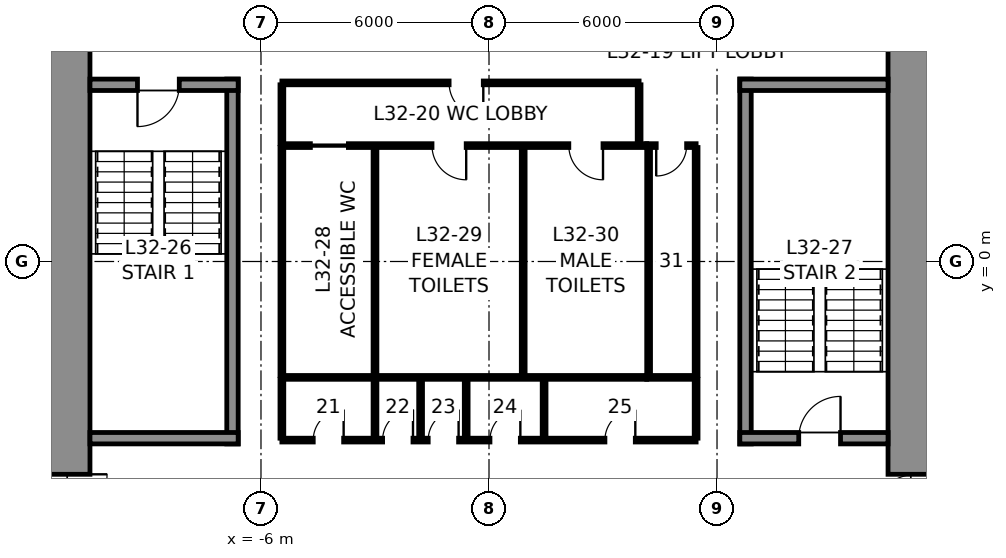
"""IFC4 building model, lengths in metres.
Left out: names, types, materials, properties, quantities, classifications, styles, units other than length and angle.
Written with IfcOpenShell. Run it as: python <this file> out.ifc"""

import sys

from ifc_helpers import new_model, si_unit, direction, frame, frame_2d, origin, place, context, subcontext, project, spatial, rectangle, extrude, element, fill, save


model = new_model("IFC4")
c1 = context("Model", 3, precision=1e-05, world=origin(), true_north=direction((0.0, 1.0)))
c2 = subcontext(c1, "Body", "Model", "MODEL_VIEW")
j1 = project(units=[si_unit("LENGTHUNIT", "METRE"), si_unit("PLANEANGLEUNIT", "RADIAN")], contexts=[c1])
p1 = place(None, origin())
s1 = spatial("IfcSite", under=j1, at=p1, CompositionType="ELEMENT")
p2 = place(p1, origin())
s2 = spatial("IfcBuilding", under=s1, at=p2, CompositionType="ELEMENT")
p3 = place(p2, frame((0.0, 0.0, 155.8)))
s3 = spatial("IfcBuildingStorey", under=s2, at=p3, CompositionType="ELEMENT", Elevation=155.8)
p4 = place(p3, frame((11.25, 10.5, 0.0), z_axis=(0.0, 0.0, 1.0), x_axis=(0.0, -1.0, 0.0)))
e1 = element("IfcWall", 1, at=p4, inside=s3, PredefinedType="SHEAR", context=c2, shape_type="SweptSolid", body=[
    extrude(rectangle(XDim=21.0, YDim=1.5, at=frame_2d((10.5, 0.0))), origin(), (0.0, 0.0, 1.0), 4.0),
])
p5 = place(p4, frame((3.7, 0.0, 0.0)))
e2 = element("IfcOpeningElement", 2, at=p5, cuts=e1, PredefinedType="OPENING", context=c2, shape_type="SweptSolid", body=[
    extrude(rectangle(XDim=1.2, YDim=2.3, at=frame_2d((0.6, 1.15))), frame((0.0, 0.76, 0.0), z_axis=(0.0, -1.0, 0.0), x_axis=(1.0, 0.0, 0.0)), (0.0, 0.0, 1.0), 1.52),
])
p6 = place(p4, frame((16.1, 0.0, 0.0)))
e3 = element("IfcOpeningElement", 3, at=p6, cuts=e1, PredefinedType="OPENING", context=c2, shape_type="SweptSolid", body=[
    extrude(rectangle(XDim=1.2, YDim=2.3, at=frame_2d((0.6, 1.15))), frame((0.0, 0.76, 0.0), z_axis=(0.0, -1.0, 0.0), x_axis=(1.0, 0.0, 0.0)), (0.0, 0.0, 1.0), 1.52),
])
p7 = place(p3, frame((-11.25, -10.5, 0.0), z_axis=(0.0, 0.0, 1.0), x_axis=(0.0, 1.0, 0.0)))
e4 = element("IfcWall", 4, at=p7, inside=s3, PredefinedType="SHEAR", context=c2, shape_type="SweptSolid", body=[
    extrude(rectangle(XDim=21.0, YDim=1.5, at=frame_2d((10.5, 0.0))), origin(), (0.0, 0.0, 1.0), 4.0),
])
p8 = place(p7, frame((16.1, 0.0, 0.0)))
e5 = element("IfcOpeningElement", 5, at=p8, cuts=e4, PredefinedType="OPENING", context=c2, shape_type="SweptSolid", body=[
    extrude(rectangle(XDim=1.2, YDim=2.3, at=frame_2d((0.6, 1.15))), frame((0.0, 0.76, 0.0), z_axis=(0.0, -1.0, 0.0), x_axis=(1.0, 0.0, 0.0)), (0.0, 0.0, 1.0), 1.52),
])
p9 = place(p7, frame((3.7, 0.0, 0.0)))
e6 = element("IfcOpeningElement", 6, at=p9, cuts=e4, PredefinedType="OPENING", context=c2, shape_type="SweptSolid", body=[
    extrude(rectangle(XDim=1.2, YDim=2.3, at=frame_2d((0.6, 1.15))), frame((0.0, 0.76, 0.0), z_axis=(0.0, -1.0, 0.0), x_axis=(1.0, 0.0, 0.0)), (0.0, 0.0, 1.0), 1.52),
])
p10 = place(p3, frame((-6.75, -4.8, 0.0), z_axis=(0.0, 0.0, 1.0), x_axis=(0.0, 1.0, 0.0)))
e7 = element("IfcWall", 7, at=p10, inside=s3, PredefinedType="SOLIDWALL", context=c2, shape_type="SweptSolid", body=[
    extrude(rectangle(XDim=9.6, YDim=0.3, at=frame_2d((4.8, 0.0))), origin(), (0.0, 0.0, 1.0), 3.75),
])
p11 = place(p3, frame((-10.5, 4.65, 0.0), z_axis=(0.0, 0.0, 1.0), x_axis=(1.0, 0.0, 0.0)))
e8 = element("IfcWall", 8, at=p11, inside=s3, PredefinedType="SOLIDWALL", context=c2, shape_type="SweptSolid", body=[
    extrude(rectangle(XDim=3.9, YDim=0.3, at=frame_2d((1.95, 0.0))), origin(), (0.0, 0.0, 1.0), 3.75),
])
p12 = place(p11, frame((1.25, 0.0, 0.0)))
e9 = element("IfcOpeningElement", 9, at=p12, cuts=e8, PredefinedType="OPENING", context=c2, shape_type="SweptSolid", body=[
    extrude(rectangle(XDim=1.1, YDim=2.3, at=frame_2d((0.55, 1.15))), frame((0.0, 0.16, 0.0), z_axis=(0.0, -1.0, 0.0), x_axis=(1.0, 0.0, 0.0)), (0.0, 0.0, 1.0), 0.32),
])
p13 = place(p3, frame((-6.6, -4.65, 0.0), z_axis=(0.0, 0.0, 1.0), x_axis=(-1.0, 0.0, 0.0)))
e10 = element("IfcWall", 10, at=p13, inside=s3, PredefinedType="SOLIDWALL", context=c2, shape_type="SweptSolid", body=[
    extrude(rectangle(XDim=3.9, YDim=0.3, at=frame_2d((1.95, 0.0))), origin(), (0.0, 0.0, 1.0), 3.75),
])
p14 = place(p3, frame((6.75, -4.8, 0.0), z_axis=(0.0, 0.0, 1.0), x_axis=(0.0, 1.0, 0.0)))
e11 = element("IfcWall", 11, at=p14, inside=s3, PredefinedType="SOLIDWALL", context=c2, shape_type="SweptSolid", body=[
    extrude(rectangle(XDim=9.6, YDim=0.3, at=frame_2d((4.8, 0.0))), origin(), (0.0, 0.0, 1.0), 3.75),
])
p15 = place(p3, frame((6.6, 4.65, 0.0), z_axis=(0.0, 0.0, 1.0), x_axis=(1.0, 0.0, 0.0)))
e12 = element("IfcWall", 12, at=p15, inside=s3, PredefinedType="SOLIDWALL", context=c2, shape_type="SweptSolid", body=[
    extrude(rectangle(XDim=3.9, YDim=0.3, at=frame_2d((1.95, 0.0))), origin(), (0.0, 0.0, 1.0), 3.75),
])
p16 = place(p3, frame((10.5, -4.65, 0.0), z_axis=(0.0, 0.0, 1.0), x_axis=(-1.0, 0.0, 0.0)))
e13 = element("IfcWall", 13, at=p16, inside=s3, PredefinedType="SOLIDWALL", context=c2, shape_type="SweptSolid", body=[
    extrude(rectangle(XDim=3.9, YDim=0.3, at=frame_2d((1.95, 0.0))), origin(), (0.0, 0.0, 1.0), 3.75),
])
p17 = place(p16, frame((1.25, 0.0, 0.0)))
e14 = element("IfcOpeningElement", 14, at=p17, cuts=e13, PredefinedType="OPENING", context=c2, shape_type="SweptSolid", body=[
    extrude(rectangle(XDim=1.1, YDim=2.3, at=frame_2d((0.55, 1.15))), frame((0.0, 0.16, 0.0), z_axis=(0.0, -1.0, 0.0), x_axis=(1.0, 0.0, 0.0)), (0.0, 0.0, 1.0), 0.32),
])
p18 = place(p3, frame((-5.45, 3.05, 0.0), z_axis=(0.0, 0.0, 1.0), x_axis=(1.0, 0.0, 0.0)))
e15 = element("IfcWall", 15, at=p18, inside=s3, PredefinedType="PARTITIONING", context=c2, shape_type="SweptSolid", body=[
    extrude(rectangle(XDim=9.6, YDim=0.1, at=frame_2d((4.8, 0.0))), origin(), (0.0, 0.0, 1.0), 3.75),
])
p19 = place(p18, frame((0.75, 0.0, 0.0)))
e16 = element("IfcOpeningElement", 16, at=p19, cuts=e15, PredefinedType="OPENING", context=c2, shape_type="SweptSolid", body=[
    extrude(rectangle(XDim=1.0, YDim=2.3, at=frame_2d((0.5, 1.15))), frame((0.0, 0.06, 0.0), z_axis=(0.0, -1.0, 0.0), x_axis=(1.0, 0.0, 0.0)), (0.0, 0.0, 1.0), 0.12),
])
p20 = place(p18, frame((3.95, 0.0, 0.0)))
e17 = element("IfcOpeningElement", 17, at=p20, cuts=e15, PredefinedType="OPENING", context=c2, shape_type="SweptSolid", body=[
    extrude(rectangle(XDim=0.9, YDim=2.3, at=frame_2d((0.45, 1.15))), frame((0.0, 0.06, 0.0), z_axis=(0.0, -1.0, 0.0), x_axis=(1.0, 0.0, 0.0)), (0.0, 0.0, 1.0), 0.12),
])
p21 = place(p18, frame((7.55, 0.0, 0.0)))
e18 = element("IfcOpeningElement", 18, at=p21, cuts=e15, PredefinedType="OPENING", context=c2, shape_type="SweptSolid", body=[
    extrude(rectangle(XDim=0.9, YDim=2.3, at=frame_2d((0.45, 1.15))), frame((0.0, 0.06, 0.0), z_axis=(0.0, -1.0, 0.0), x_axis=(1.0, 0.0, 0.0)), (0.0, 0.0, 1.0), 0.12),
])
p22 = place(p3, frame((4.15, 3.05, 0.0), z_axis=(0.0, 0.0, 1.0), x_axis=(1.0, 0.0, 0.0)))
e19 = element("IfcWall", 19, at=p22, inside=s3, PredefinedType="PARTITIONING", context=c2, shape_type="SweptSolid", body=[
    extrude(rectangle(XDim=1.3, YDim=0.1, at=frame_2d((0.65, 0.0))), origin(), (0.0, 0.0, 1.0), 3.75),
])
p23 = place(p22, frame((0.25, 0.0, 0.0)))
e20 = element("IfcOpeningElement", 20, at=p23, cuts=e19, PredefinedType="OPENING", context=c2, shape_type="SweptSolid", body=[
    extrude(rectangle(XDim=0.8, YDim=2.3, at=frame_2d((0.4, 1.15))), frame((0.0, 0.06, 0.0), z_axis=(0.0, -1.0, 0.0), x_axis=(1.0, 0.0, 0.0)), (0.0, 0.0, 1.0), 0.12),
])
p24 = place(p3, frame((4.15, -3.05, 0.0), z_axis=(0.0, 0.0, 1.0), x_axis=(-1.0, 0.0, 0.0)))
e21 = element("IfcWall", 21, at=p24, inside=s3, PredefinedType="PARTITIONING", context=c2, shape_type="SweptSolid", body=[
    extrude(rectangle(XDim=9.6, YDim=0.1, at=frame_2d((4.8, 0.0))), origin(), (0.0, 0.0, 1.0), 3.75),
])
p25 = place(p3, frame((5.45, -3.05, 0.0), z_axis=(0.0, 0.0, 1.0), x_axis=(-1.0, 0.0, 0.0)))
e22 = element("IfcWall", 22, at=p25, inside=s3, PredefinedType="PARTITIONING", context=c2, shape_type="SweptSolid", body=[
    extrude(rectangle(XDim=1.3, YDim=0.1, at=frame_2d((0.65, 0.0))), origin(), (0.0, 0.0, 1.0), 3.75),
])
for number, where, z_axis, x_axis in (
    (23, (5.45, 3.0, 0.0), (0.0, 0.0, 1.0), (0.0, -1.0, 0.0)),
    (24, (-5.45, -3.0, 0.0), (0.0, 0.0, 1.0), (0.0, 1.0, 0.0)),
    (25, (-3.0, -3.0, 0.0), (0.0, 0.0, 1.0), (0.0, 1.0, 0.0)),
    (26, (0.9, -3.0, 0.0), (0.0, 0.0, 1.0), (0.0, 1.0, 0.0)),
    (27, (4.2, -3.0, 0.0), (0.0, 0.0, 1.0), (0.0, 1.0, 0.0)),
):
    element("IfcWall", number, at=place(p3, frame(where, z_axis=z_axis, x_axis=x_axis)), inside=s3, PredefinedType="PARTITIONING", context=c2, shape_type="SweptSolid", body=[
        extrude(rectangle(XDim=6.0, YDim=0.1, at=frame_2d((3.0, 0.0))), origin(), (0.0, 0.0, 1.0), 3.75),
    ])
p26 = place(p3, frame((-5.45, 4.7, 0.0), z_axis=(0.0, 0.0, 1.0), x_axis=(1.0, 0.0, 0.0)))
e28 = element("IfcWall", 28, at=p26, inside=s3, PredefinedType="PARTITIONING", context=c2, shape_type="SweptSolid", body=[
    extrude(rectangle(XDim=9.4, YDim=0.1, at=frame_2d((4.7, 0.0))), origin(), (0.0, 0.0, 1.0), 3.75),
])
p27 = place(p26, frame((4.4, 0.0, 0.0)))
e29 = element("IfcOpeningElement", 29, at=p27, cuts=e28, PredefinedType="OPENING", context=c2, shape_type="SweptSolid", body=[
    extrude(rectangle(XDim=0.9, YDim=2.3, at=frame_2d((0.45, 1.15))), frame((0.0, 0.06, 0.0), z_axis=(0.0, -1.0, 0.0), x_axis=(1.0, 0.0, 0.0)), (0.0, 0.0, 1.0), 0.12),
])
for number, where, z_axis, x_axis in (
    (30, (-5.45, 3.1, 0.0), (0.0, 0.0, 1.0), (0.0, 1.0, 0.0)),
    (31, (3.95, 3.1, 0.0), (0.0, 0.0, 1.0), (0.0, 1.0, 0.0)),
):
    element("IfcWall", number, at=place(p3, frame(where, z_axis=z_axis, x_axis=x_axis)), inside=s3, PredefinedType="PARTITIONING", context=c2, shape_type="SweptSolid", body=[
        extrude(rectangle(XDim=1.55, YDim=0.1, at=frame_2d((0.775, 0.0))), origin(), (0.0, 0.0, 1.0), 3.75),
    ])
p28 = place(p3, frame((5.45, -4.7, 0.0), z_axis=(0.0, 0.0, 1.0), x_axis=(-1.0, 0.0, 0.0)))
e32 = element("IfcWall", 32, at=p28, inside=s3, PredefinedType="PARTITIONING", context=c2, shape_type="SweptSolid", body=[
    extrude(rectangle(XDim=10.9, YDim=0.1, at=frame_2d((5.45, 0.0))), origin(), (0.0, 0.0, 1.0), 3.75),
])
p29 = place(p28, frame((9.275, 0.0, 0.0)))
e33 = element("IfcOpeningElement", 33, at=p29, cuts=e32, PredefinedType="OPENING", context=c2, shape_type="SweptSolid", body=[
    extrude(rectangle(XDim=0.8, YDim=2.3, at=frame_2d((0.4, 1.15))), frame((0.0, 0.06, 0.0), z_axis=(0.0, -1.0, 0.0), x_axis=(1.0, 0.0, 0.0)), (0.0, 0.0, 1.0), 0.12),
])
p30 = place(p28, frame((7.45, 0.0, 0.0)))
e34 = element("IfcOpeningElement", 34, at=p30, cuts=e32, PredefinedType="OPENING", context=c2, shape_type="SweptSolid", body=[
    extrude(rectangle(XDim=0.8, YDim=2.3, at=frame_2d((0.4, 1.15))), frame((0.0, 0.06, 0.0), z_axis=(0.0, -1.0, 0.0), x_axis=(1.0, 0.0, 0.0)), (0.0, 0.0, 1.0), 0.12),
])
p31 = place(p28, frame((6.25, 0.0, 0.0)))
e35 = element("IfcOpeningElement", 35, at=p31, cuts=e32, PredefinedType="OPENING", context=c2, shape_type="SweptSolid", body=[
    extrude(rectangle(XDim=0.8, YDim=2.3, at=frame_2d((0.4, 1.15))), frame((0.0, 0.06, 0.0), z_axis=(0.0, -1.0, 0.0), x_axis=(1.0, 0.0, 0.0)), (0.0, 0.0, 1.0), 0.12),
])
p32 = place(p28, frame((4.625, 0.0, 0.0)))
e36 = element("IfcOpeningElement", 36, at=p32, cuts=e32, PredefinedType="OPENING", context=c2, shape_type="SweptSolid", body=[
    extrude(rectangle(XDim=0.8, YDim=2.3, at=frame_2d((0.4, 1.15))), frame((0.0, 0.06, 0.0), z_axis=(0.0, -1.0, 0.0), x_axis=(1.0, 0.0, 0.0)), (0.0, 0.0, 1.0), 0.12),
])
p33 = place(p28, frame((1.6, 0.0, 0.0)))
e37 = element("IfcOpeningElement", 37, at=p33, cuts=e32, PredefinedType="OPENING", context=c2, shape_type="SweptSolid", body=[
    extrude(rectangle(XDim=0.8, YDim=2.3, at=frame_2d((0.4, 1.15))), frame((0.0, 0.06, 0.0), z_axis=(0.0, -1.0, 0.0), x_axis=(1.0, 0.0, 0.0)), (0.0, 0.0, 1.0), 0.12),
])
for number, where, z_axis, x_axis in (
    (38, (-5.45, -3.1, 0.0), (0.0, 0.0, 1.0), (0.0, -1.0, 0.0)),
    (39, (5.45, -3.1, 0.0), (0.0, 0.0, 1.0), (0.0, -1.0, 0.0)),
    (40, (-3.0, -3.1, 0.0), (0.0, 0.0, 1.0), (0.0, -1.0, 0.0)),
    (41, (-1.8, -3.1, 0.0), (0.0, 0.0, 1.0), (0.0, -1.0, 0.0)),
    (42, (-0.6, -3.1, 0.0), (0.0, 0.0, 1.0), (0.0, -1.0, 0.0)),
    (43, (1.45, -3.1, 0.0), (0.0, 0.0, 1.0), (0.0, -1.0, 0.0)),
):
    element("IfcWall", number, at=place(p3, frame(where, z_axis=z_axis, x_axis=x_axis)), inside=s3, PredefinedType="PARTITIONING", context=c2, shape_type="SweptSolid", body=[
        extrude(rectangle(XDim=1.55, YDim=0.1, at=frame_2d((0.775, 0.0))), origin(), (0.0, 0.0, 1.0), 3.75),
    ])
p34 = place(p12, frame((1.1, 0.0, 0.0), z_axis=(0.0, 0.0, 1.0), x_axis=(-1.0, 0.0, 0.0)))
e44 = element("IfcDoor", 44, at=p34, inside=s3, OperationType="SINGLE_SWING_RIGHT", PredefinedType="DOOR", context=c2, shape_type="SweptSolid", body=[
    extrude(rectangle(XDim=1.1, YDim=2.3, at=frame_2d((0.55, 1.15))), frame((0.0, 0.025, 0.0), z_axis=(0.0, -1.0, 0.0), x_axis=(1.0, 0.0, 0.0)), (0.0, 0.0, 1.0), 0.05),
])
fill(e9, e44)
p35 = place(p17, frame((1.1, 0.0, 0.0), z_axis=(0.0, 0.0, 1.0), x_axis=(-1.0, 0.0, 0.0)))
e45 = element("IfcDoor", 45, at=p35, inside=s3, OperationType="SINGLE_SWING_RIGHT", PredefinedType="DOOR", context=c2, shape_type="SweptSolid", body=[
    extrude(rectangle(XDim=1.1, YDim=2.3, at=frame_2d((0.55, 1.15))), frame((0.0, 0.025, 0.0), z_axis=(0.0, -1.0, 0.0), x_axis=(1.0, 0.0, 0.0)), (0.0, 0.0, 1.0), 0.05),
])
fill(e14, e45)
p36 = place(p19, frame((1.0, 0.0, 0.0), z_axis=(0.0, 0.0, 1.0), x_axis=(-1.0, 0.0, 0.0)))
e46 = element("IfcDoor", 46, at=p36, inside=s3, OperationType="SLIDING_TO_LEFT", PredefinedType="DOOR", context=c2, shape_type="SweptSolid", body=[
    extrude(rectangle(XDim=1.0, YDim=2.3, at=frame_2d((0.5, 1.15))), frame((0.0, 0.025, 0.0), z_axis=(0.0, -1.0, 0.0), x_axis=(1.0, 0.0, 0.0)), (0.0, 0.0, 1.0), 0.05),
])
fill(e16, e46)
p37 = place(p20, frame((0.9, 0.0, 0.0), z_axis=(0.0, 0.0, 1.0), x_axis=(-1.0, 0.0, 0.0)))
e47 = element("IfcDoor", 47, at=p37, inside=s3, OperationType="SINGLE_SWING_LEFT", PredefinedType="DOOR", context=c2, shape_type="SweptSolid", body=[
    extrude(rectangle(XDim=0.9, YDim=2.3, at=frame_2d((0.45, 1.15))), frame((0.0, 0.025, 0.0), z_axis=(0.0, -1.0, 0.0), x_axis=(1.0, 0.0, 0.0)), (0.0, 0.0, 1.0), 0.05),
])
fill(e17, e47)
p38 = place(p21, frame((0.9, 0.0, 0.0), z_axis=(0.0, 0.0, 1.0), x_axis=(-1.0, 0.0, 0.0)))
e48 = element("IfcDoor", 48, at=p38, inside=s3, OperationType="SINGLE_SWING_LEFT", PredefinedType="DOOR", context=c2, shape_type="SweptSolid", body=[
    extrude(rectangle(XDim=0.9, YDim=2.3, at=frame_2d((0.45, 1.15))), frame((0.0, 0.025, 0.0), z_axis=(0.0, -1.0, 0.0), x_axis=(1.0, 0.0, 0.0)), (0.0, 0.0, 1.0), 0.05),
])
fill(e18, e48)
p39 = place(p23, frame((0.8, 0.0, 0.0), z_axis=(0.0, 0.0, 1.0), x_axis=(-1.0, 0.0, 0.0)))
e49 = element("IfcDoor", 49, at=p39, inside=s3, OperationType="SINGLE_SWING_RIGHT", PredefinedType="DOOR", context=c2, shape_type="SweptSolid", body=[
    extrude(rectangle(XDim=0.8, YDim=2.3, at=frame_2d((0.4, 1.15))), frame((0.0, 0.025, 0.0), z_axis=(0.0, -1.0, 0.0), x_axis=(1.0, 0.0, 0.0)), (0.0, 0.0, 1.0), 0.05),
])
fill(e20, e49)
p40 = place(p27, frame((0.9, 0.0, 0.0), z_axis=(0.0, 0.0, 1.0), x_axis=(-1.0, 0.0, 0.0)))
e50 = element("IfcDoor", 50, at=p40, inside=s3, OperationType="SINGLE_SWING_LEFT", PredefinedType="DOOR", context=c2, shape_type="SweptSolid", body=[
    extrude(rectangle(XDim=0.9, YDim=2.3, at=frame_2d((0.45, 1.15))), frame((0.0, 0.025, 0.0), z_axis=(0.0, -1.0, 0.0), x_axis=(1.0, 0.0, 0.0)), (0.0, 0.0, 1.0), 0.05),
])
fill(e29, e50)
p41 = place(p29, frame((0.8, 0.0, 0.0), z_axis=(0.0, 0.0, 1.0), x_axis=(-1.0, 0.0, 0.0)))
e51 = element("IfcDoor", 51, at=p41, inside=s3, OperationType="SINGLE_SWING_RIGHT", PredefinedType="DOOR", context=c2, shape_type="SweptSolid", body=[
    extrude(rectangle(XDim=0.8, YDim=2.3, at=frame_2d((0.4, 1.15))), frame((0.0, 0.025, 0.0), z_axis=(0.0, -1.0, 0.0), x_axis=(1.0, 0.0, 0.0)), (0.0, 0.0, 1.0), 0.05),
])
fill(e33, e51)
p42 = place(p30, frame((0.8, 0.0, 0.0), z_axis=(0.0, 0.0, 1.0), x_axis=(-1.0, 0.0, 0.0)))
e52 = element("IfcDoor", 52, at=p42, inside=s3, OperationType="SINGLE_SWING_RIGHT", PredefinedType="DOOR", context=c2, shape_type="SweptSolid", body=[
    extrude(rectangle(XDim=0.8, YDim=2.3, at=frame_2d((0.4, 1.15))), frame((0.0, 0.025, 0.0), z_axis=(0.0, -1.0, 0.0), x_axis=(1.0, 0.0, 0.0)), (0.0, 0.0, 1.0), 0.05),
])
fill(e34, e52)
p43 = place(p31, frame((0.8, 0.0, 0.0), z_axis=(0.0, 0.0, 1.0), x_axis=(-1.0, 0.0, 0.0)))
e53 = element("IfcDoor", 53, at=p43, inside=s3, OperationType="SINGLE_SWING_RIGHT", PredefinedType="DOOR", context=c2, shape_type="SweptSolid", body=[
    extrude(rectangle(XDim=0.8, YDim=2.3, at=frame_2d((0.4, 1.15))), frame((0.0, 0.025, 0.0), z_axis=(0.0, -1.0, 0.0), x_axis=(1.0, 0.0, 0.0)), (0.0, 0.0, 1.0), 0.05),
])
fill(e35, e53)
p44 = place(p32, frame((0.8, 0.0, 0.0), z_axis=(0.0, 0.0, 1.0), x_axis=(-1.0, 0.0, 0.0)))
e54 = element("IfcDoor", 54, at=p44, inside=s3, OperationType="SINGLE_SWING_RIGHT", PredefinedType="DOOR", context=c2, shape_type="SweptSolid", body=[
    extrude(rectangle(XDim=0.8, YDim=2.3, at=frame_2d((0.4, 1.15))), frame((0.0, 0.025, 0.0), z_axis=(0.0, -1.0, 0.0), x_axis=(1.0, 0.0, 0.0)), (0.0, 0.0, 1.0), 0.05),
])
fill(e36, e54)
p45 = place(p33, frame((0.8, 0.0, 0.0), z_axis=(0.0, 0.0, 1.0), x_axis=(-1.0, 0.0, 0.0)))
e55 = element("IfcDoor", 55, at=p45, inside=s3, OperationType="SINGLE_SWING_RIGHT", PredefinedType="DOOR", context=c2, shape_type="SweptSolid", body=[
    extrude(rectangle(XDim=0.8, YDim=2.3, at=frame_2d((0.4, 1.15))), frame((0.0, 0.025, 0.0), z_axis=(0.0, -1.0, 0.0), x_axis=(1.0, 0.0, 0.0)), (0.0, 0.0, 1.0), 0.05),
])
fill(e37, e55)
p46 = place(p9, frame((1.2, 0.0, 0.0), z_axis=(0.0, 0.0, 1.0), x_axis=(-1.0, 0.0, 0.0)))
e56 = element("IfcDoor", 56, at=p46, inside=s3, OperationType="SINGLE_SWING_LEFT", PredefinedType="DOOR", context=c2, shape_type="SweptSolid", body=[
    extrude(rectangle(XDim=1.2, YDim=2.3, at=frame_2d((0.6, 1.15))), frame((0.0, 0.025, 0.0), z_axis=(0.0, -1.0, 0.0), x_axis=(1.0, 0.0, 0.0)), (0.0, 0.0, 1.0), 0.05),
])
fill(e6, e56)
p47 = place(p6, frame((1.2, 0.0, 0.0), z_axis=(0.0, 0.0, 1.0), x_axis=(-1.0, 0.0, 0.0)))
e57 = element("IfcDoor", 57, at=p47, inside=s3, OperationType="SINGLE_SWING_LEFT", PredefinedType="DOOR", context=c2, shape_type="SweptSolid", body=[
    extrude(rectangle(XDim=1.2, YDim=2.3, at=frame_2d((0.6, 1.15))), frame((0.0, 0.025, 0.0), z_axis=(0.0, -1.0, 0.0), x_axis=(1.0, 0.0, 0.0)), (0.0, 0.0, 1.0), 0.05),
])
fill(e3, e57)
save(model, sys.argv[1])
